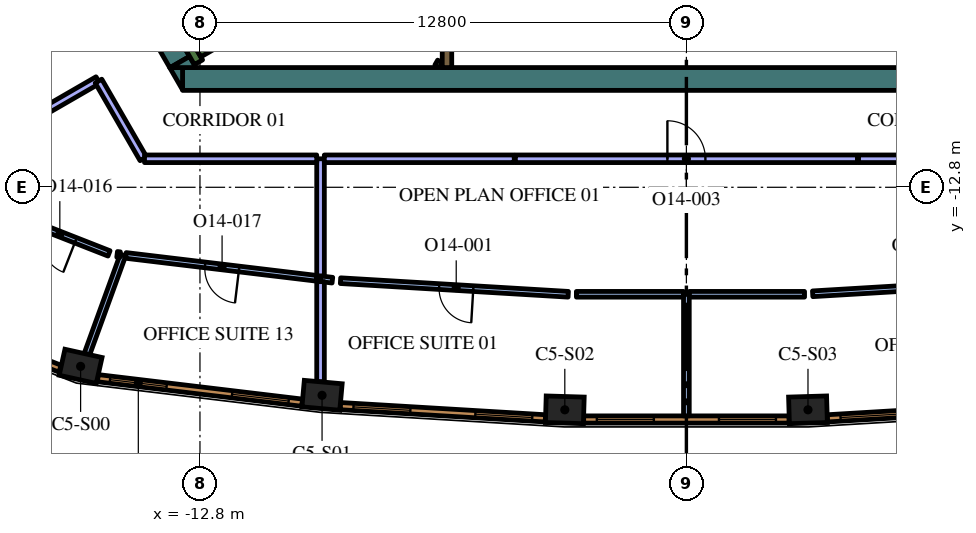
"""IFC4 building model, lengths in metres.
Left out: names, types, materials, properties, quantities, classifications, styles, units other than length and angle.
Written with IfcOpenShell. Run it as: python <this file> out.ifc"""

import sys

from ifc_helpers import new_model, si_unit, direction, frame, frame_2d, origin, origin_2d, place, context, subcontext, project, spatial, polyline, rectangle, outline, extrude, element, fill, save


model = new_model("IFC4")
c1 = context("Model", 3, precision=1e-05, world=origin(), true_north=direction((0.0, 1.0)))
c2 = subcontext(c1, "Body", "Model", "MODEL_VIEW")
j1 = project(units=[si_unit("LENGTHUNIT", "METRE"), si_unit("PLANEANGLEUNIT", "RADIAN")], contexts=[c1])
p1 = place(None, origin())
s1 = spatial("IfcSite", under=j1, at=p1, CompositionType="ELEMENT")
p2 = place(p1, origin())
s2 = spatial("IfcBuilding", under=s1, at=p2, CompositionType="ELEMENT")
p3 = place(p2, frame((0.0, 0.0, 304.8)))
s3 = spatial("IfcBuildingStorey", under=s2, at=p3, CompositionType="ELEMENT", Elevation=304.8)
for number, where, z_axis, x_axis in (
    (1, (-15.941, -17.512, 0.0), (0.0, 0.0, 1.0), (0.976, -0.217, 0.0)),
    (2, (-9.587, -18.274, 0.0), (0.0, 0.0, 1.0), (0.996, -0.089, 0.0)),
    (3, (-3.199, -18.655, 0.0), (0.0, 0.0, 1.0), (1.0, -0.03, 0.0)),
    (4, (3.199, -18.655, 0.0), (0.0, 0.0, 1.0), (1.0, 0.03, 0.0)),
):
    element("IfcColumn", number, at=place(p3, frame(where, z_axis=z_axis, x_axis=x_axis)), inside=s3, PredefinedType="COLUMN", context=c2, shape_type="SweptSolid", body=[
        extrude(rectangle(XDim=1.0, YDim=0.7, at=origin_2d()), origin(), (0.0, 0.0, 1.0), 4.2),
    ])
p4 = place(p3, frame((8.904, -9.95, 0.0), z_axis=(0.0, 0.0, 1.0), x_axis=(-1.0, 0.0, 0.0)))
e5 = element("IfcWall", 5, at=p4, inside=s3, PredefinedType="SOLIDWALL", context=c2, shape_type="SweptSolid", body=[
    extrude(rectangle(XDim=22.161, YDim=0.6, at=frame_2d((11.081, 0.0))), origin(), (0.0, 0.0, 1.0), 4.2),
])
p5 = place(p3, origin())
e6 = element("IfcWall", 6, at=p5, inside=s3, PredefinedType="SOLIDWALL", context=c2, shape_type="SweptSolid", body=[
    extrude(outline(polyline([(-13.597, -9.65), (-13.259, -9.65), (-13.259, -10.236), (-13.597, -9.65)])), origin(), (0.0, 0.0, 1.0), 4.2),
])
p6 = place(p3, frame((-13.333, -9.506, 0.0), z_axis=(0.0, 0.0, 1.0), x_axis=(-0.500019073792, 0.866014391245, 0.0)))
e7 = element("IfcWall", 7, at=p6, inside=s3, PredefinedType="SOLIDWALL", context=c2, shape_type="SweptSolid", body=[
    extrude(rectangle(XDim=3.823, YDim=0.6, at=frame_2d((1.912, 0.0))), origin(), (0.0, 0.0, 1.0), 4.2),
])
e8 = element("IfcWall", 8, at=p5, inside=s3, PredefinedType="SOLIDWALL", context=c2, shape_type="SweptSolid", body=[
    extrude(outline(polyline([(-12.904, -9.65), (-13.58, -9.65), (-13.073, -9.357), (-12.904, -9.65)])), origin(), (0.0, 0.0, 1.0), 4.2),
])
p7 = place(p3, frame((-12.84, -9.511, 0.0), z_axis=(0.0, 0.0, 1.0), x_axis=(-0.499997733992, 0.866026712061, 0.0)))
e9 = element("IfcWall", 9, at=p7, inside=s3, PredefinedType="SOLIDWALL", context=c2, shape_type="SweptSolid", body=[
    extrude(rectangle(XDim=3.634, YDim=0.25, at=frame_2d((1.817, 0.0))), origin(), (0.0, 0.0, 1.0), 4.2),
])
p8 = place(p3, frame((-12.84, -9.261, 0.0), z_axis=(0.0, 0.0, 1.0), x_axis=(0.866016039709, 0.500016218704, 0.0)))
e10 = element("IfcWall", 10, at=p8, inside=s3, PredefinedType="SOLIDWALL", context=c2, shape_type="SweptSolid", body=[
    extrude(rectangle(XDim=7.05, YDim=0.25, at=frame_2d((3.525, 0.0))), origin(), (0.0, 0.0, 1.0), 4.2),
])
p9 = place(p3, frame((-6.3, -9.65, 0.0), z_axis=(0.0, 0.0, 1.0), x_axis=(0.0, 1.0, 0.0)))
e11 = element("IfcWall", 11, at=p9, inside=s3, PredefinedType="SOLIDWALL", context=c2, shape_type="SweptSolid", body=[
    extrude(rectangle(XDim=0.816, YDim=0.25, at=frame_2d((0.408, 0.0))), origin(), (0.0, 0.0, 1.0), 4.2),
])
p10 = place(p3, frame((-6.553, -9.618, 0.0), z_axis=(0.0, 0.0, 1.0), x_axis=(0.499915430684, 0.866074224396, 0.0)))
e12 = element("IfcWall", 12, at=p10, inside=s3, PredefinedType="PARTITIONING", context=c2, shape_type="SweptSolid", body=[
    extrude(rectangle(XDim=0.146, YDim=0.15, at=frame_2d((0.073, 0.0))), origin(), (0.0, 0.0, 1.0), 3.55),
])
p11 = place(p3, frame((0.0, -15.615, 0.0), z_axis=(0.0, 0.0, 1.0), x_axis=(0.0, -1.0, 0.0)))
e13 = element("IfcWall", 13, at=p11, inside=s3, PredefinedType="PARTITIONING", context=c2, shape_type="SweptSolid", body=[
    extrude(rectangle(XDim=3.2, YDim=0.15, at=frame_2d((1.6, 0.0))), origin(), (0.0, 0.0, 1.0), 3.55),
])
p12 = place(p3, frame((-9.627, -15.207, 0.0), z_axis=(0.0, 0.0, 1.0), x_axis=(0.992909886905, -0.118869493503, 0.0)))
e14 = element("IfcWall", 14, at=p12, inside=s3, PredefinedType="PARTITIONING", context=c2, shape_type="SweptSolid", body=[
    extrude(rectangle(XDim=0.314, YDim=0.15, at=frame_2d((0.157, 0.0))), origin(), (0.0, 0.0, 1.0), 3.55),
])
p13 = place(p3, frame((-3.109, -15.615, 0.0), z_axis=(0.0, 0.0, 1.0), x_axis=(-0.998221243398, 0.059618363188, 0.0)))
e15 = element("IfcWall", 15, at=p13, inside=s3, PredefinedType="PARTITIONING", context=c2, shape_type="SweptSolid", body=[
    extrude(rectangle(XDim=6.003, YDim=0.15, at=frame_2d((3.002, 0.0))), origin(), (0.0, 0.0, 1.0), 3.55),
])
p14 = place(p13, frame((2.503, 0.0, 0.0)))
e16 = element("IfcOpeningElement", 16, at=p14, cuts=e15, PredefinedType="OPENING", context=c2, shape_type="SweptSolid", body=[
    extrude(rectangle(XDim=0.9, YDim=2.1, at=frame_2d((0.45, 1.05))), frame((0.0, 0.085, 0.0), z_axis=(0.0, -1.0, 0.0), x_axis=(1.0, 0.0, 0.0)), (0.0, 0.0, 1.0), 0.17),
])
p15 = place(p3, frame((-2.895, -15.615, 0.0), z_axis=(0.0, 0.0, 1.0), x_axis=(1.0, 0.0, 0.0)))
e17 = element("IfcWall", 17, at=p15, inside=s3, PredefinedType="PARTITIONING", context=c2, shape_type="SweptSolid", body=[
    extrude(rectangle(XDim=2.82, YDim=0.15, at=frame_2d((1.41, 0.0))), origin(), (0.0, 0.0, 1.0), 3.55),
])
p16 = place(p3, frame((-9.627, -17.919, 0.0), z_axis=(0.0, 0.0, 1.0), x_axis=(0.0, 1.0, 0.0)))
e18 = element("IfcWall", 18, at=p16, inside=s3, PredefinedType="PARTITIONING", context=c2, shape_type="SweptSolid", body=[
    extrude(rectangle(XDim=2.636, YDim=0.2, at=frame_2d((1.318, 0.0))), origin(), (0.0, 0.0, 1.0), 3.55),
])
p17 = place(p3, frame((0.075, -15.615, 0.0), z_axis=(0.0, 0.0, 1.0), x_axis=(1.0, 0.0, 0.0)))
e19 = element("IfcWall", 19, at=p17, inside=s3, PredefinedType="PARTITIONING", context=c2, shape_type="SweptSolid", body=[
    extrude(rectangle(XDim=3.034, YDim=0.15, at=frame_2d((1.517, 0.0))), origin(), (0.0, 0.0, 1.0), 3.55),
])
p18 = place(p3, frame((9.315, -15.244, 0.0), z_axis=(0.0, 0.0, 1.0), x_axis=(-0.998218822372, -0.059658885864, 0.0)))
e20 = element("IfcWall", 20, at=p18, inside=s3, PredefinedType="PARTITIONING", context=c2, shape_type="SweptSolid", body=[
    extrude(rectangle(XDim=6.003, YDim=0.15, at=frame_2d((3.002, 0.0))), origin(), (0.0, 0.0, 1.0), 3.55),
])
p19 = place(p18, frame((2.503, 0.0, 0.0)))
e21 = element("IfcOpeningElement", 21, at=p19, cuts=e20, PredefinedType="OPENING", context=c2, shape_type="SweptSolid", body=[
    extrude(rectangle(XDim=0.9, YDim=2.1, at=frame_2d((0.45, 1.05))), frame((0.0, 0.085, 0.0), z_axis=(0.0, -1.0, 0.0), x_axis=(1.0, 0.0, 0.0)), (0.0, 0.0, 1.0), 0.17),
])
p20 = place(p3, frame((-9.627, -15.132, 0.0), z_axis=(0.0, 0.0, 1.0), x_axis=(0.0, 1.0, 0.0)))
e22 = element("IfcWall", 22, at=p20, inside=s3, PredefinedType="PARTITIONING", context=c2, shape_type="SweptSolid", body=[
    extrude(rectangle(XDim=3.082, YDim=0.2, at=frame_2d((1.541, 0.0))), origin(), (0.0, 0.0, 1.0), 3.55),
])
p21 = place(p3, frame((-4.5, -12.05, 0.0), z_axis=(0.0, 0.0, 1.0), x_axis=(1.0, 0.0, 0.0)))
e23 = element("IfcWall", 23, at=p21, inside=s3, PredefinedType="PARTITIONING", context=c2, shape_type="SweptSolid", body=[
    extrude(rectangle(XDim=9.0, YDim=0.2, at=frame_2d((4.5, 0.0))), origin(), (0.0, 0.0, 1.0), 3.55),
])
p22 = place(p21, frame((4.0, 0.0, 0.0)))
e24 = element("IfcOpeningElement", 24, at=p22, cuts=e23, PredefinedType="OPENING", context=c2, shape_type="SweptSolid", body=[
    extrude(rectangle(XDim=1.0, YDim=2.1, at=frame_2d((0.5, 1.05))), frame((0.0, 0.11, 0.0), z_axis=(0.0, -1.0, 0.0), x_axis=(1.0, 0.0, 0.0)), (0.0, 0.0, 1.0), 0.22),
])
for number, where, z_axis, x_axis in (
    (25, (-9.527, -12.05, 0.0), (0.0, 0.0, 1.0), (1.0, 0.0, 0.0)),
    (26, (4.53, -12.05, 0.0), (0.0, 0.0, 1.0), (1.0, 0.0, 0.0)),
):
    element("IfcWall", number, at=place(p3, frame(where, z_axis=z_axis, x_axis=x_axis)), inside=s3, PredefinedType="PARTITIONING", context=c2, shape_type="SweptSolid", body=[
        extrude(rectangle(XDim=4.997, YDim=0.2, at=frame_2d((2.499, 0.0))), origin(), (0.0, 0.0, 1.0), 3.55),
    ])
p23 = place(p3, frame((-14.826, -14.584, 0.0), z_axis=(0.0, 0.0, 1.0), x_axis=(-0.341806672652, -0.9397702903, 0.0)))
e27 = element("IfcWall", 27, at=p23, inside=s3, PredefinedType="PARTITIONING", context=c2, shape_type="SweptSolid", body=[
    extrude(rectangle(XDim=2.773, YDim=0.15, at=frame_2d((1.387, 0.0))), origin(), (0.0, 0.0, 1.0), 3.55),
])
p24 = place(p3, frame((-15.193, -14.54, 0.0), z_axis=(0.0, 0.0, 1.0), x_axis=(-0.930968616147, 0.36509921357, 0.0)))
e28 = element("IfcWall", 28, at=p24, inside=s3, PredefinedType="PARTITIONING", context=c2, shape_type="SweptSolid", body=[
    extrude(rectangle(XDim=2.841, YDim=0.15, at=frame_2d((1.42, 0.0))), origin(), (0.0, 0.0, 1.0), 3.55),
])
p25 = place(p24, frame((0.941, 0.0, 0.0)))
e29 = element("IfcOpeningElement", 29, at=p25, cuts=e28, PredefinedType="OPENING", context=c2, shape_type="SweptSolid", body=[
    extrude(rectangle(XDim=0.9, YDim=2.1, at=frame_2d((0.45, 1.05))), frame((0.0, 0.085, 0.0), z_axis=(0.0, -1.0, 0.0), x_axis=(1.0, 0.0, 0.0)), (0.0, 0.0, 1.0), 0.17),
])
p26 = place(p3, frame((-14.98, -14.565, 0.0), z_axis=(0.0, 0.0, 1.0), x_axis=(0.992847073299, -0.119393002485, 0.0)))
e30 = element("IfcWall", 30, at=p26, inside=s3, PredefinedType="PARTITIONING", context=c2, shape_type="SweptSolid", body=[
    extrude(rectangle(XDim=0.078, YDim=0.15, at=frame_2d((0.039, 0.0))), origin(), (0.0, 0.0, 1.0), 3.55),
])
p27 = place(p3, frame((-9.727, -15.195, 0.0), z_axis=(0.0, 0.0, 1.0), x_axis=(-0.992892587246, 0.119013907556, 0.0)))
e31 = element("IfcWall", 31, at=p27, inside=s3, PredefinedType="PARTITIONING", context=c2, shape_type="SweptSolid", body=[
    extrude(rectangle(XDim=5.059, YDim=0.15, at=frame_2d((2.529, 0.0))), origin(), (0.0, 0.0, 1.0), 3.55),
])
p28 = place(p27, frame((2.059, 0.0, 0.0)))
e32 = element("IfcOpeningElement", 32, at=p28, cuts=e31, PredefinedType="OPENING", context=c2, shape_type="SweptSolid", body=[
    extrude(rectangle(XDim=0.9, YDim=2.1, at=frame_2d((0.45, 1.05))), frame((0.0, 0.085, 0.0), z_axis=(0.0, -1.0, 0.0), x_axis=(1.0, 0.0, 0.0)), (0.0, 0.0, 1.0), 0.17),
])
for number, where, z_axis, x_axis in (
    (33, (-16.411, -8.436, 0.0), (0.0, 0.0, 1.0), (-0.866, -0.5, 0.0)),
    (34, (-17.364, -11.064, 0.0), (0.0, 0.0, 1.0), (0.866, 0.5, 0.0)),
):
    element("IfcWall", number, at=place(p3, frame(where, z_axis=z_axis, x_axis=x_axis)), inside=s3, PredefinedType="PARTITIONING", context=c2, shape_type="SweptSolid", body=[
        extrude(rectangle(XDim=2.17, YDim=0.2, at=frame_2d((1.085, 0.0))), origin(), (0.0, 0.0, 1.0), 3.55),
    ])
p29 = place(p3, frame((-15.47, -10.005, 0.0), z_axis=(0.0, 0.0, 1.0), x_axis=(0.500053625724, -0.865994440744, 0.0)))
e35 = element("IfcWall", 35, at=p29, inside=s3, PredefinedType="PARTITIONING", context=c2, shape_type="SweptSolid", body=[
    extrude(rectangle(XDim=2.361, YDim=0.2, at=frame_2d((1.181, 0.0))), origin(), (0.0, 0.0, 1.0), 3.55),
])
p30 = place(p3, frame((-14.26, -12.05, 0.0), z_axis=(0.0, 0.0, 1.0), x_axis=(1.0, 0.0, 0.0)))
e36 = element("IfcWall", 36, at=p30, inside=s3, PredefinedType="PARTITIONING", context=c2, shape_type="SweptSolid", body=[
    extrude(rectangle(XDim=4.532, YDim=0.2, at=frame_2d((2.266, 0.0))), origin(), (0.0, 0.0, 1.0), 3.55),
])
p31 = place(p3, frame((-15.487, -17.823, 0.0), z_axis=(0.0, 0.0, 1.0), x_axis=(0.992885582795, -0.119072328769, 0.0)))
e37 = element("IfcWall", 37, at=p31, inside=s3, PredefinedType="SOLIDWALL", context=c2, shape_type="SweptSolid", body=[
    extrude(rectangle(XDim=5.415, YDim=0.19, at=frame_2d((2.708, 0.0))), origin(), (0.0, 0.0, 1.0), 3.95),
])
p32 = place(p31, frame((0.323, 0.0, 0.6)))
e38 = element("IfcOpeningElement", 38, at=p32, cuts=e37, PredefinedType="OPENING", context=c2, shape_type="SweptSolid", body=[
    extrude(rectangle(XDim=1.5, YDim=2.85, at=frame_2d((0.75, 1.425))), frame((0.0, 0.105, 0.0), z_axis=(0.0, -1.0, 0.0), x_axis=(1.0, 0.0, 0.0)), (0.0, 0.0, 1.0), 0.21),
])
p33 = place(p31, frame((3.558, 0.0, 0.6)))
e39 = element("IfcOpeningElement", 39, at=p33, cuts=e37, PredefinedType="OPENING", context=c2, shape_type="SweptSolid", body=[
    extrude(rectangle(XDim=1.5, YDim=2.85, at=frame_2d((0.75, 1.425))), frame((0.0, 0.105, 0.0), z_axis=(0.0, -1.0, 0.0), x_axis=(1.0, 0.0, 0.0)), (0.0, 0.0, 1.0), 0.21),
])
p34 = place(p3, frame((-9.107, -18.558, 0.0), z_axis=(0.0, 0.0, 1.0), x_axis=(0.998221492823, -0.059614186786, 0.0)))
e40 = element("IfcWall", 40, at=p34, inside=s3, PredefinedType="SOLIDWALL", context=c2, shape_type="SweptSolid", body=[
    extrude(rectangle(XDim=5.406, YDim=0.19, at=frame_2d((2.703, 0.0))), origin(), (0.0, 0.0, 1.0), 3.95),
])
p35 = place(p34, frame((0.346, 0.0, 0.6)))
e41 = element("IfcOpeningElement", 41, at=p35, cuts=e40, PredefinedType="OPENING", context=c2, shape_type="SweptSolid", body=[
    extrude(rectangle(XDim=1.5, YDim=2.85, at=frame_2d((0.75, 1.425))), frame((0.0, 0.105, 0.0), z_axis=(0.0, -1.0, 0.0), x_axis=(1.0, 0.0, 0.0)), (0.0, 0.0, 1.0), 0.21),
])
p36 = place(p34, frame((3.559, 0.0, 0.6)))
e42 = element("IfcOpeningElement", 42, at=p36, cuts=e40, PredefinedType="OPENING", context=c2, shape_type="SweptSolid", body=[
    extrude(rectangle(XDim=1.5, YDim=2.85, at=frame_2d((0.75, 1.425))), frame((0.0, 0.105, 0.0), z_axis=(0.0, -1.0, 0.0), x_axis=(1.0, 0.0, 0.0)), (0.0, 0.0, 1.0), 0.21),
])
p37 = place(p3, frame((-2.703, -18.91, 0.0), z_axis=(0.0, 0.0, 1.0), x_axis=(1.0, 0.0, 0.0)))
e43 = element("IfcWall", 43, at=p37, inside=s3, PredefinedType="SOLIDWALL", context=c2, shape_type="SweptSolid", body=[
    extrude(rectangle(XDim=5.406, YDim=0.19, at=frame_2d((2.703, 0.0))), origin(), (0.0, 0.0, 1.0), 3.95),
])
p38 = place(p37, frame((0.346, 0.0, 0.6)))
e44 = element("IfcOpeningElement", 44, at=p38, cuts=e43, PredefinedType="OPENING", context=c2, shape_type="SweptSolid", body=[
    extrude(rectangle(XDim=1.5, YDim=2.85, at=frame_2d((0.75, 1.425))), frame((0.0, 0.105, 0.0), z_axis=(0.0, -1.0, 0.0), x_axis=(1.0, 0.0, 0.0)), (0.0, 0.0, 1.0), 0.21),
])
p39 = place(p37, frame((3.56, 0.0, 0.6)))
e45 = element("IfcOpeningElement", 45, at=p39, cuts=e43, PredefinedType="OPENING", context=c2, shape_type="SweptSolid", body=[
    extrude(rectangle(XDim=1.5, YDim=2.85, at=frame_2d((0.75, 1.425))), frame((0.0, 0.105, 0.0), z_axis=(0.0, -1.0, 0.0), x_axis=(1.0, 0.0, 0.0)), (0.0, 0.0, 1.0), 0.21),
])
p40 = place(p3, frame((3.71, -18.88, 0.0), z_axis=(0.0, 0.0, 1.0), x_axis=(0.998221492823, 0.059614186786, 0.0)))
e46 = element("IfcWall", 46, at=p40, inside=s3, PredefinedType="SOLIDWALL", context=c2, shape_type="SweptSolid", body=[
    extrude(rectangle(XDim=5.406, YDim=0.19, at=frame_2d((2.703, 0.0))), origin(), (0.0, 0.0, 1.0), 3.95),
])
p41 = place(p40, frame((0.346, 0.0, 0.6)))
e47 = element("IfcOpeningElement", 47, at=p41, cuts=e46, PredefinedType="OPENING", context=c2, shape_type="SweptSolid", body=[
    extrude(rectangle(XDim=1.5, YDim=2.85, at=frame_2d((0.75, 1.425))), frame((0.0, 0.105, 0.0), z_axis=(0.0, -1.0, 0.0), x_axis=(1.0, 0.0, 0.0)), (0.0, 0.0, 1.0), 0.21),
])
p42 = place(p40, frame((3.559, 0.0, 0.6)))
e48 = element("IfcOpeningElement", 48, at=p42, cuts=e46, PredefinedType="OPENING", context=c2, shape_type="SweptSolid", body=[
    extrude(rectangle(XDim=1.5, YDim=2.85, at=frame_2d((0.75, 1.425))), frame((0.0, 0.105, 0.0), z_axis=(0.0, -1.0, 0.0), x_axis=(1.0, 0.0, 0.0)), (0.0, 0.0, 1.0), 0.21),
])
p43 = place(p3, frame((-19.496, -16.392, 0.0), z_axis=(0.0, 0.0, 1.0), x_axis=(0.93100888477, -0.364996515709, 0.0)))
e49 = element("IfcWall", 49, at=p43, inside=s3, PredefinedType="SOLIDWALL", context=c2, shape_type="SweptSolid", body=[
    extrude(rectangle(XDim=3.237, YDim=0.19, at=frame_2d((1.618, 0.0))), origin(), (0.0, 0.0, 1.0), 3.95),
])
p44 = place(p43, frame((1.068, 0.0, 0.6)))
e50 = element("IfcOpeningElement", 50, at=p44, cuts=e49, PredefinedType="OPENING", context=c2, shape_type="SweptSolid", body=[
    extrude(rectangle(XDim=1.1, YDim=2.85, at=frame_2d((0.55, 1.425))), frame((0.0, 0.105, 0.0), z_axis=(0.0, -1.0, 0.0), x_axis=(1.0, 0.0, 0.0)), (0.0, 0.0, 1.0), 0.21),
])
p45 = place(p14, origin())
e51 = element("IfcDoor", 51, at=p45, inside=s3, OperationType="SINGLE_SWING_LEFT", PredefinedType="DOOR", context=c2, shape_type="SweptSolid", body=[
    extrude(rectangle(XDim=0.9, YDim=2.1, at=frame_2d((0.45, 1.05))), frame((0.0, 0.025, 0.0), z_axis=(0.0, -1.0, 0.0), x_axis=(1.0, 0.0, 0.0)), (0.0, 0.0, 1.0), 0.05),
])
fill(e16, e51)
p46 = place(p22, origin())
e52 = element("IfcDoor", 52, at=p46, inside=s3, OperationType="SINGLE_SWING_RIGHT", PredefinedType="DOOR", context=c2, shape_type="SweptSolid", body=[
    extrude(rectangle(XDim=1.0, YDim=2.1, at=frame_2d((0.5, 1.05))), frame((0.0, 0.025, 0.0), z_axis=(0.0, -1.0, 0.0), x_axis=(1.0, 0.0, 0.0)), (0.0, 0.0, 1.0), 0.05),
])
fill(e24, e52)
p47 = place(p25, origin())
e53 = element("IfcDoor", 53, at=p47, inside=s3, OperationType="SINGLE_SWING_LEFT", PredefinedType="DOOR", context=c2, shape_type="SweptSolid", body=[
    extrude(rectangle(XDim=0.9, YDim=2.1, at=frame_2d((0.45, 1.05))), frame((0.0, 0.025, 0.0), z_axis=(0.0, -1.0, 0.0), x_axis=(1.0, 0.0, 0.0)), (0.0, 0.0, 1.0), 0.05),
])
fill(e29, e53)
p48 = place(p28, origin())
e54 = element("IfcDoor", 54, at=p48, inside=s3, OperationType="SINGLE_SWING_LEFT", PredefinedType="DOOR", context=c2, shape_type="SweptSolid", body=[
    extrude(rectangle(XDim=0.9, YDim=2.1, at=frame_2d((0.45, 1.05))), frame((0.0, 0.025, 0.0), z_axis=(0.0, -1.0, 0.0), x_axis=(1.0, 0.0, 0.0)), (0.0, 0.0, 1.0), 0.05),
])
fill(e32, e54)
p49 = place(p32, origin())
e55 = element("IfcWindow", 55, at=p49, inside=s3, PartitioningType="SINGLE_PANEL", PredefinedType="WINDOW", context=c2, shape_type="SweptSolid", body=[
    extrude(rectangle(XDim=1.5, YDim=2.85, at=frame_2d((0.75, 1.425))), frame((0.0, 0.045, 0.0), z_axis=(0.0, -1.0, 0.0), x_axis=(1.0, 0.0, 0.0)), (0.0, 0.0, 1.0), 0.06),
])
fill(e38, e55)
p50 = place(p33, origin())
e56 = element("IfcWindow", 56, at=p50, inside=s3, PartitioningType="SINGLE_PANEL", PredefinedType="WINDOW", context=c2, shape_type="SweptSolid", body=[
    extrude(rectangle(XDim=1.5, YDim=2.85, at=frame_2d((0.75, 1.425))), frame((0.0, 0.045, 0.0), z_axis=(0.0, -1.0, 0.0), x_axis=(1.0, 0.0, 0.0)), (0.0, 0.0, 1.0), 0.06),
])
fill(e39, e56)
p51 = place(p35, origin())
e57 = element("IfcWindow", 57, at=p51, inside=s3, PartitioningType="SINGLE_PANEL", PredefinedType="WINDOW", context=c2, shape_type="SweptSolid", body=[
    extrude(rectangle(XDim=1.5, YDim=2.85, at=frame_2d((0.75, 1.425))), frame((0.0, 0.045, 0.0), z_axis=(0.0, -1.0, 0.0), x_axis=(1.0, 0.0, 0.0)), (0.0, 0.0, 1.0), 0.06),
])
fill(e41, e57)
p52 = place(p36, origin())
e58 = element("IfcWindow", 58, at=p52, inside=s3, PartitioningType="SINGLE_PANEL", PredefinedType="WINDOW", context=c2, shape_type="SweptSolid", body=[
    extrude(rectangle(XDim=1.5, YDim=2.85, at=frame_2d((0.75, 1.425))), frame((0.0, 0.045, 0.0), z_axis=(0.0, -1.0, 0.0), x_axis=(1.0, 0.0, 0.0)), (0.0, 0.0, 1.0), 0.06),
])
fill(e42, e58)
p53 = place(p38, origin())
e59 = element("IfcWindow", 59, at=p53, inside=s3, PartitioningType="SINGLE_PANEL", PredefinedType="WINDOW", context=c2, shape_type="SweptSolid", body=[
    extrude(rectangle(XDim=1.5, YDim=2.85, at=frame_2d((0.75, 1.425))), frame((0.0, 0.045, 0.0), z_axis=(0.0, -1.0, 0.0), x_axis=(1.0, 0.0, 0.0)), (0.0, 0.0, 1.0), 0.06),
])
fill(e44, e59)
p54 = place(p39, origin())
e60 = element("IfcWindow", 60, at=p54, inside=s3, PartitioningType="SINGLE_PANEL", PredefinedType="WINDOW", context=c2, shape_type="SweptSolid", body=[
    extrude(rectangle(XDim=1.5, YDim=2.85, at=frame_2d((0.75, 1.425))), frame((0.0, 0.045, 0.0), z_axis=(0.0, -1.0, 0.0), x_axis=(1.0, 0.0, 0.0)), (0.0, 0.0, 1.0), 0.06),
])
fill(e45, e60)
p55 = place(p41, origin())
e61 = element("IfcWindow", 61, at=p55, inside=s3, PartitioningType="SINGLE_PANEL", PredefinedType="WINDOW", context=c2, shape_type="SweptSolid", body=[
    extrude(rectangle(XDim=1.5, YDim=2.85, at=frame_2d((0.75, 1.425))), frame((0.0, 0.045, 0.0), z_axis=(0.0, -1.0, 0.0), x_axis=(1.0, 0.0, 0.0)), (0.0, 0.0, 1.0), 0.06),
])
fill(e47, e61)
save(model, sys.argv[1])
